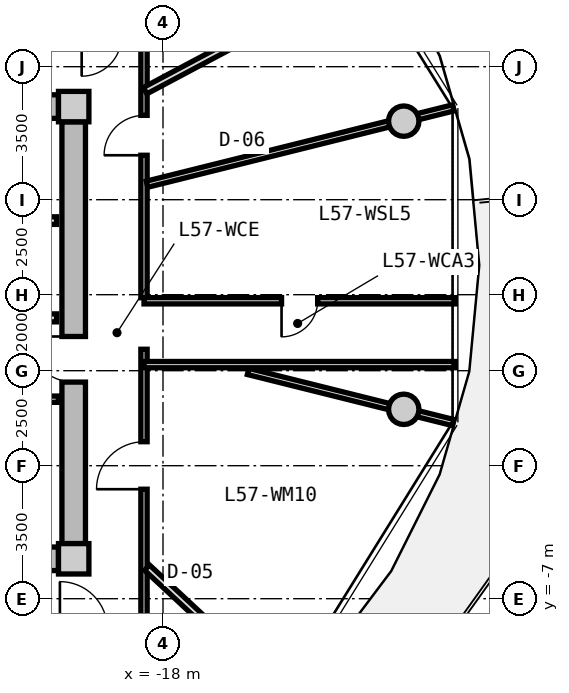
"""IFC4 building model, lengths in metres.
Left out: names, types, materials, properties, quantities, classifications, styles, units other than length and angle.
Written with IfcOpenShell. Run it as: python <this file> out.ifc"""

import sys

from ifc_helpers import new_model, si_unit, direction, frame, frame_2d, origin, origin_2d, place, context, subcontext, project, spatial, rectangle, circle, extrude, source, transform, mapped, element, fill, save


model = new_model("IFC4")
c1 = context("Model", 3, precision=1e-05, world=origin(), true_north=direction((0.0, 1.0)))
c2 = subcontext(c1, "Body", "Model", "MODEL_VIEW")
j1 = project(units=[si_unit("LENGTHUNIT", "METRE"), si_unit("PLANEANGLEUNIT", "RADIAN")], contexts=[c1])
p1 = place(None, origin())
s1 = spatial("IfcSite", under=j1, at=p1, CompositionType="ELEMENT")
p2 = place(p1, origin())
s2 = spatial("IfcBuilding", under=s1, at=p2, CompositionType="ELEMENT")
p3 = place(p2, frame((0.0, 0.0, 183.1)))
s3 = spatial("IfcBuildingStorey", under=s2, at=p3, CompositionType="ELEMENT", Elevation=183.1)
m1 = source(origin(), c2, "Body", "SweptSolid", [
    extrude(rectangle(XDim=0.8, YDim=0.8, at=origin_2d()), origin(), (0.0, 0.0, 1.0), 3.05),
])
for number, where, z_axis, x_axis in (
    (1, (-20.35, -5.95, 0.0), (0.0, 0.0, 1.0), (1.0, 0.0, 0.0)),
    (2, (-20.35, 5.95, 0.0), (0.0, 0.0, 1.0), (1.0, 0.0, 0.0)),
):
    element("IfcColumn", number, at=place(p3, frame(where, z_axis=z_axis, x_axis=x_axis)), inside=s3, PredefinedType="COLUMN", context=c2, shape_type="MappedRepresentation", body=[
        mapped(m1, transform((0.0, 0.0, 0.0), x_axis=(1.0, 0.0, 0.0), y_axis=(0.0, 1.0, 0.0), z_axis=(0.0, 0.0, 1.0), scale=1.0)),
    ])
m2 = source(origin(), c2, "Body", "SweptSolid", [
    extrude(rectangle(XDim=14.5, YDim=0.62, at=frame_2d((7.25, 0.0))), origin(), (0.0, 0.0, 1.0), 2.73),
])
for number, where, z_axis, x_axis in (
    (3, (-35.25, 5.95, 0.0), (0.0, 0.0, 1.0), (1.0, 0.0, 0.0)),
    (4, (-20.75, -5.95, 0.0), (0.0, 0.0, 1.0), (-1.0, 0.0, 0.0)),
):
    element("IfcWall", number, at=place(p3, frame(where, z_axis=z_axis, x_axis=x_axis)), inside=s3, PredefinedType="SHEAR", context=c2, shape_type="MappedRepresentation", body=[
        mapped(m2, transform((0.0, 0.0, 0.0), x_axis=(1.0, 0.0, 0.0), y_axis=(0.0, 1.0, 0.0), z_axis=(0.0, 0.0, 1.0), scale=1.0)),
    ])
m3 = source(origin(), c2, "Body", "SweptSolid", [
    extrude(rectangle(XDim=11.1, YDim=0.62, at=frame_2d((5.55, 0.0))), origin(), (0.0, 0.0, 1.0), 2.73),
])
p4 = place(p3, frame((-20.35, 5.55, 0.0), z_axis=(0.0, 0.0, 1.0), x_axis=(0.0, -1.0, 0.0)))
e5 = element("IfcWall", 5, at=p4, inside=s3, PredefinedType="SHEAR", context=c2, shape_type="MappedRepresentation", body=[
    mapped(m3, transform((0.0, 0.0, 0.0), x_axis=(1.0, 0.0, 0.0), y_axis=(0.0, 1.0, 0.0), z_axis=(0.0, 0.0, 1.0), scale=1.0)),
])
p5 = place(p4, frame((5.65, 0.0, 0.0)))
e6 = element("IfcOpeningElement", 6, at=p5, cuts=e5, PredefinedType="OPENING", context=c2, shape_type="SweptSolid", body=[
    extrude(rectangle(XDim=1.2, YDim=2.15, at=frame_2d((0.6, 1.075))), frame((0.0, 0.32, 0.0), z_axis=(0.0, -1.0, 0.0), x_axis=(1.0, 0.0, 0.0)), (0.0, 0.0, 1.0), 0.64),
])
m4 = source(origin(), c2, "Body", "SweptSolid", [
    extrude(circle(Radius=0.4, at=origin_2d()), origin(), (0.0, 0.0, 1.0), 3.05),
])
for number, where, z_axis, x_axis in (
    (7, (-11.665, 5.567, 0.0), (0.0, 0.0, 1.0), (1.0, 0.0, 0.0)),
    (8, (-11.665, -2.016, 0.0), (0.0, 0.0, 1.0), (1.0, 0.0, 0.0)),
):
    element("IfcColumn", number, at=place(p3, frame(where, z_axis=z_axis, x_axis=x_axis)), inside=s3, PredefinedType="COLUMN", context=c2, shape_type="MappedRepresentation", body=[
        mapped(m4, transform((0.0, 0.0, 0.0), x_axis=(1.0, 0.0, 0.0), y_axis=(0.0, 1.0, 0.0), z_axis=(0.0, 0.0, 1.0), scale=1.0)),
    ])
m5 = source(origin(), c2, "Body", "SweptSolid", [
    extrude(rectangle(XDim=3.2, YDim=0.2, at=frame_2d((1.6, 0.0))), origin(), (0.0, 0.0, 1.0), 2.715),
])
p6 = place(p3, frame((-24.0, 2.95, 0.0), z_axis=(0.0, 0.0, 1.0), x_axis=(1.0, 0.0, 0.0)))
e9 = element("IfcWall", 9, at=p6, inside=s3, PredefinedType="PARTITIONING", context=c2, shape_type="MappedRepresentation", body=[
    mapped(m5, transform((0.0, 0.0, 0.0), x_axis=(1.0, 0.0, 0.0), y_axis=(0.0, 1.0, 0.0), z_axis=(0.0, 0.0, 1.0), scale=1.0)),
])
m6 = source(origin(), c2, "Body", "SweptSolid", [
    extrude(rectangle(XDim=6.66, YDim=0.21, at=frame_2d((3.33, 0.0))), origin(), (0.0, 0.0, 1.0), 2.715),
])
p7 = place(p3, frame((-27.46, 0.39, 0.0), z_axis=(0.0, 0.0, 1.0), x_axis=(1.0, 0.0, 0.0)))
e10 = element("IfcWall", 10, at=p7, inside=s3, PredefinedType="PARTITIONING", context=c2, shape_type="MappedRepresentation", body=[
    mapped(m6, transform((0.0, 0.0, 0.0), x_axis=(1.0, 0.0, 0.0), y_axis=(0.0, 1.0, 0.0), z_axis=(0.0, 0.0, 1.0), scale=1.0)),
])
p8 = place(p7, frame((1.0, 0.0, 0.0)))
e11 = element("IfcOpeningElement", 11, at=p8, cuts=e10, PredefinedType="OPENING", context=c2, shape_type="SweptSolid", body=[
    extrude(rectangle(XDim=1.2, YDim=2.15, at=frame_2d((0.6, 1.075))), frame((0.0, 0.115, 0.0), z_axis=(0.0, -1.0, 0.0), x_axis=(1.0, 0.0, 0.0)), (0.0, 0.0, 1.0), 0.23),
])
m7 = source(origin(), c2, "Body", "SweptSolid", [
    extrude(rectangle(XDim=2.7, YDim=0.165, at=frame_2d((1.35, 0.0))), origin(), (0.0, 0.0, 1.0), 2.715),
])
p9 = place(p3, frame((-23.45, -1.75, 0.0), z_axis=(0.0, 0.0, 1.0), x_axis=(1.0, 0.0, 0.0)))
e12 = element("IfcWall", 12, at=p9, inside=s3, PredefinedType="PARTITIONING", context=c2, shape_type="MappedRepresentation", body=[
    mapped(m7, transform((0.0, 0.0, 0.0), x_axis=(1.0, 0.0, 0.0), y_axis=(0.0, 1.0, 0.0), z_axis=(0.0, 0.0, 1.0), scale=1.0)),
])
p10 = place(p9, frame((0.222, 0.0, 0.0)))
e13 = element("IfcOpeningElement", 13, at=p10, cuts=e12, PredefinedType="OPENING", context=c2, shape_type="SweptSolid", body=[
    extrude(rectangle(XDim=0.925, YDim=2.1, at=frame_2d((0.462, 1.05))), frame((0.0, 0.093, 0.0), z_axis=(0.0, -1.0, 0.0), x_axis=(1.0, 0.0, 0.0)), (0.0, 0.0, 1.0), 0.185),
])
p11 = place(p9, frame((1.522, 0.0, 0.0)))
e14 = element("IfcOpeningElement", 14, at=p11, cuts=e12, PredefinedType="OPENING", context=c2, shape_type="SweptSolid", body=[
    extrude(rectangle(XDim=0.925, YDim=2.1, at=frame_2d((0.462, 1.05))), frame((0.0, 0.093, 0.0), z_axis=(0.0, -1.0, 0.0), x_axis=(1.0, 0.0, 0.0)), (0.0, 0.0, 1.0), 0.185),
])
m8 = source(origin(), c2, "Body", "SweptSolid", [
    extrude(rectangle(XDim=6.88, YDim=0.165, at=frame_2d((3.44, 0.0))), origin(), (0.0, 0.0, 1.0), 2.715),
])
p12 = place(p3, frame((-18.5, 7.8, 0.0), z_axis=(0.0, 0.0, 1.0), x_axis=(0.0, -1.0, 0.0)))
e15 = element("IfcWall", 15, at=p12, inside=s3, PredefinedType="PARTITIONING", context=c2, shape_type="MappedRepresentation", body=[
    mapped(m8, transform((0.0, 0.0, 0.0), x_axis=(1.0, 0.0, 0.0), y_axis=(0.0, 1.0, 0.0), z_axis=(0.0, 0.0, 1.0), scale=1.0)),
])
p13 = place(p12, frame((2.081, 0.0, 0.0)))
e16 = element("IfcOpeningElement", 16, at=p13, cuts=e15, PredefinedType="OPENING", context=c2, shape_type="SweptSolid", body=[
    extrude(rectangle(XDim=1.05, YDim=2.15, at=frame_2d((0.525, 1.075))), frame((0.0, 0.093, 0.0), z_axis=(0.0, -1.0, 0.0), x_axis=(1.0, 0.0, 0.0)), (0.0, 0.0, 1.0), 0.185),
])
m9 = source(origin(), c2, "Body", "SweptSolid", [
    extrude(rectangle(XDim=7.365, YDim=0.165, at=frame_2d((3.682, 0.0))), origin(), (0.0, 0.0, 1.0), 2.715),
])
p14 = place(p3, frame((-18.5, -0.436, 0.0), z_axis=(0.0, 0.0, 1.0), x_axis=(0.0, -1.0, 0.0)))
e17 = element("IfcWall", 17, at=p14, inside=s3, PredefinedType="PARTITIONING", context=c2, shape_type="MappedRepresentation", body=[
    mapped(m9, transform((0.0, 0.0, 0.0), x_axis=(1.0, 0.0, 0.0), y_axis=(0.0, 1.0, 0.0), z_axis=(0.0, 0.0, 1.0), scale=1.0)),
])
p15 = place(p14, frame((2.433, 0.0, 0.0)))
e18 = element("IfcOpeningElement", 18, at=p15, cuts=e17, PredefinedType="OPENING", context=c2, shape_type="SweptSolid", body=[
    extrude(rectangle(XDim=1.25, YDim=2.2, at=frame_2d((0.625, 1.1))), frame((0.0, 0.093, 0.0), z_axis=(0.0, -1.0, 0.0), x_axis=(1.0, 0.0, 0.0)), (0.0, 0.0, 1.0), 0.185),
])
m10 = source(origin(), c2, "Body", "SweptSolid", [
    extrude(rectangle(XDim=5.564, YDim=0.165, at=frame_2d((2.782, 0.0))), origin(), (0.0, 0.0, 1.0), 2.265),
])
p16 = place(p3, frame((-15.76, -1.02, 0.0), z_axis=(0.0, 0.0, 1.0), x_axis=(0.970315176167, -0.241843872984, 0.0)))
e19 = element("IfcWall", 19, at=p16, inside=s3, PredefinedType="PARTITIONING", context=c2, shape_type="MappedRepresentation", body=[
    mapped(m10, transform((0.0, 0.0, 0.0), x_axis=(1.0, 0.0, 0.0), y_axis=(0.0, 1.0, 0.0), z_axis=(0.0, 0.0, 1.0), scale=1.0)),
])
m11 = source(origin(), c2, "Body", "SweptSolid", [
    extrude(rectangle(XDim=8.305, YDim=0.165, at=frame_2d((4.153, 0.0))), origin(), (0.0, 0.0, 1.0), 2.265),
])
p17 = place(p3, frame((-18.42, 3.908, 0.0), z_axis=(0.0, 0.0, 1.0), x_axis=(0.970309994378, 0.241864662175, 0.0)))
e20 = element("IfcWall", 20, at=p17, inside=s3, PredefinedType="PARTITIONING", context=c2, shape_type="MappedRepresentation", body=[
    mapped(m11, transform((0.0, 0.0, 0.0), x_axis=(1.0, 0.0, 0.0), y_axis=(0.0, 1.0, 0.0), z_axis=(0.0, 0.0, 1.0), scale=1.0)),
])
m12 = source(origin(), c2, "Body", "SweptSolid", [
    extrude(rectangle(XDim=8.189, YDim=0.165, at=frame_2d((4.094, 0.0))), origin(), (0.0, 0.0, 1.0), 2.715),
])
p18 = place(p3, frame((-18.5, 0.84, 0.0), z_axis=(0.0, 0.0, 1.0), x_axis=(1.0, 0.0, 0.0)))
e21 = element("IfcWall", 21, at=p18, inside=s3, PredefinedType="PARTITIONING", context=c2, shape_type="MappedRepresentation", body=[
    mapped(m12, transform((0.0, 0.0, 0.0), x_axis=(1.0, 0.0, 0.0), y_axis=(0.0, 1.0, 0.0), z_axis=(0.0, 0.0, 1.0), scale=1.0)),
])
p19 = place(p18, frame((3.619, 0.0, 0.0)))
e22 = element("IfcOpeningElement", 22, at=p19, cuts=e21, PredefinedType="OPENING", context=c2, shape_type="SweptSolid", body=[
    extrude(rectangle(XDim=0.95, YDim=2.1, at=frame_2d((0.475, 1.05))), frame((0.0, 0.093, 0.0), z_axis=(0.0, -1.0, 0.0), x_axis=(1.0, 0.0, 0.0)), (0.0, 0.0, 1.0), 0.185),
])
p20 = place(p3, frame((-10.311, -0.84, 0.0), z_axis=(0.0, 0.0, 1.0), x_axis=(-1.0, 0.0, 0.0)))
e23 = element("IfcWall", 23, at=p20, inside=s3, PredefinedType="PARTITIONING", context=c2, shape_type="MappedRepresentation", body=[
    mapped(m12, transform((0.0, 0.0, 0.0), x_axis=(1.0, 0.0, 0.0), y_axis=(0.0, 1.0, 0.0), z_axis=(0.0, 0.0, 1.0), scale=1.0)),
])
m13 = source(origin(), c2, "Body", "SweptSolid", [
    extrude(rectangle(XDim=6.665, YDim=0.19, at=frame_2d((3.333, 0.0))), origin(), (0.0, 0.0, 1.0), 2.715),
])
p21 = place(p3, frame((-18.47, 6.37, 0.0), z_axis=(0.0, 0.0, 1.0), x_axis=(0.88263769619, 0.470053930166, 0.0)))
e24 = element("IfcWall", 24, at=p21, inside=s3, PredefinedType="PARTITIONING", context=c2, shape_type="MappedRepresentation", body=[
    mapped(m13, transform((0.0, 0.0, 0.0), x_axis=(1.0, 0.0, 0.0), y_axis=(0.0, 1.0, 0.0), z_axis=(0.0, 0.0, 1.0), scale=1.0)),
])
m14 = source(origin(), c2, "Body", "SweptSolid", [
    extrude(rectangle(XDim=4.927, YDim=0.19, at=frame_2d((2.463, 0.0))), origin(), (0.0, 0.0, 1.0), 2.265),
])
p22 = place(p3, frame((-18.42, -6.183, 0.0), z_axis=(0.0, 0.0, 1.0), x_axis=(0.732191335987, -0.681098999783, 0.0)))
e25 = element("IfcWall", 25, at=p22, inside=s3, PredefinedType="PARTITIONING", context=c2, shape_type="MappedRepresentation", body=[
    mapped(m14, transform((0.0, 0.0, 0.0), x_axis=(1.0, 0.0, 0.0), y_axis=(0.0, 1.0, 0.0), z_axis=(0.0, 0.0, 1.0), scale=1.0)),
])
m15 = source(origin(), c2, "Body", "SweptSolid", [
    extrude(rectangle(XDim=1.2, YDim=2.15, at=frame_2d((0.6, 1.075))), frame((0.0, 0.025, 0.0), z_axis=(0.0, -1.0, 0.0), x_axis=(1.0, 0.0, 0.0)), (0.0, 0.0, 1.0), 0.05),
])
p23 = place(p5, frame((1.2, 0.0, 0.0), z_axis=(0.0, 0.0, 1.0), x_axis=(-1.0, 0.0, 0.0)))
e26 = element("IfcDoor", 26, at=p23, inside=s3, OperationType="SINGLE_SWING_RIGHT", PredefinedType="DOOR", context=c2, shape_type="MappedRepresentation", body=[
    mapped(m15, transform((0.0, 0.0, 0.0), x_axis=(1.0, 0.0, 0.0), y_axis=(0.0, 1.0, 0.0), z_axis=(0.0, 0.0, 1.0), scale=1.0)),
])
fill(e6, e26)
m16 = source(origin(), c2, "Body", "SweptSolid", [
    extrude(rectangle(XDim=0.95, YDim=2.1, at=frame_2d((0.475, 1.05))), frame((0.0, 0.025, 0.0), z_axis=(0.0, -1.0, 0.0), x_axis=(1.0, 0.0, 0.0)), (0.0, 0.0, 1.0), 0.05),
])
p24 = place(p19, frame((0.95, 0.0, 0.0), z_axis=(0.0, 0.0, 1.0), x_axis=(-1.0, 0.0, 0.0)))
e27 = element("IfcDoor", 27, at=p24, inside=s3, OperationType="SINGLE_SWING_RIGHT", PredefinedType="DOOR", context=c2, shape_type="MappedRepresentation", body=[
    mapped(m16, transform((0.0, 0.0, 0.0), x_axis=(1.0, 0.0, 0.0), y_axis=(0.0, 1.0, 0.0), z_axis=(0.0, 0.0, 1.0), scale=1.0)),
])
fill(e22, e27)
m17 = source(origin(), c2, "Body", "SweptSolid", [
    extrude(rectangle(XDim=1.05, YDim=2.15, at=frame_2d((0.525, 1.075))), frame((0.0, 0.025, 0.0), z_axis=(0.0, -1.0, 0.0), x_axis=(1.0, 0.0, 0.0)), (0.0, 0.0, 1.0), 0.05),
])
p25 = place(p13, frame((1.05, 0.0, 0.0), z_axis=(0.0, 0.0, 1.0), x_axis=(-1.0, 0.0, 0.0)))
e28 = element("IfcDoor", 28, at=p25, inside=s3, OperationType="SINGLE_SWING_LEFT", PredefinedType="DOOR", context=c2, shape_type="MappedRepresentation", body=[
    mapped(m17, transform((0.0, 0.0, 0.0), x_axis=(1.0, 0.0, 0.0), y_axis=(0.0, 1.0, 0.0), z_axis=(0.0, 0.0, 1.0), scale=1.0)),
])
fill(e16, e28)
m18 = source(origin(), c2, "Body", "SweptSolid", [
    extrude(rectangle(XDim=1.25, YDim=2.2, at=frame_2d((0.625, 1.1))), frame((0.0, 0.025, 0.0), z_axis=(0.0, -1.0, 0.0), x_axis=(1.0, 0.0, 0.0)), (0.0, 0.0, 1.0), 0.05),
])
p26 = place(p15, frame((1.25, 0.0, 0.0), z_axis=(0.0, 0.0, 1.0), x_axis=(-1.0, 0.0, 0.0)))
e29 = element("IfcDoor", 29, at=p26, inside=s3, OperationType="SINGLE_SWING_LEFT", PredefinedType="DOOR", context=c2, shape_type="MappedRepresentation", body=[
    mapped(m18, transform((0.0, 0.0, 0.0), x_axis=(1.0, 0.0, 0.0), y_axis=(0.0, 1.0, 0.0), z_axis=(0.0, 0.0, 1.0), scale=1.0)),
])
fill(e18, e29)
save(model, sys.argv[1])
